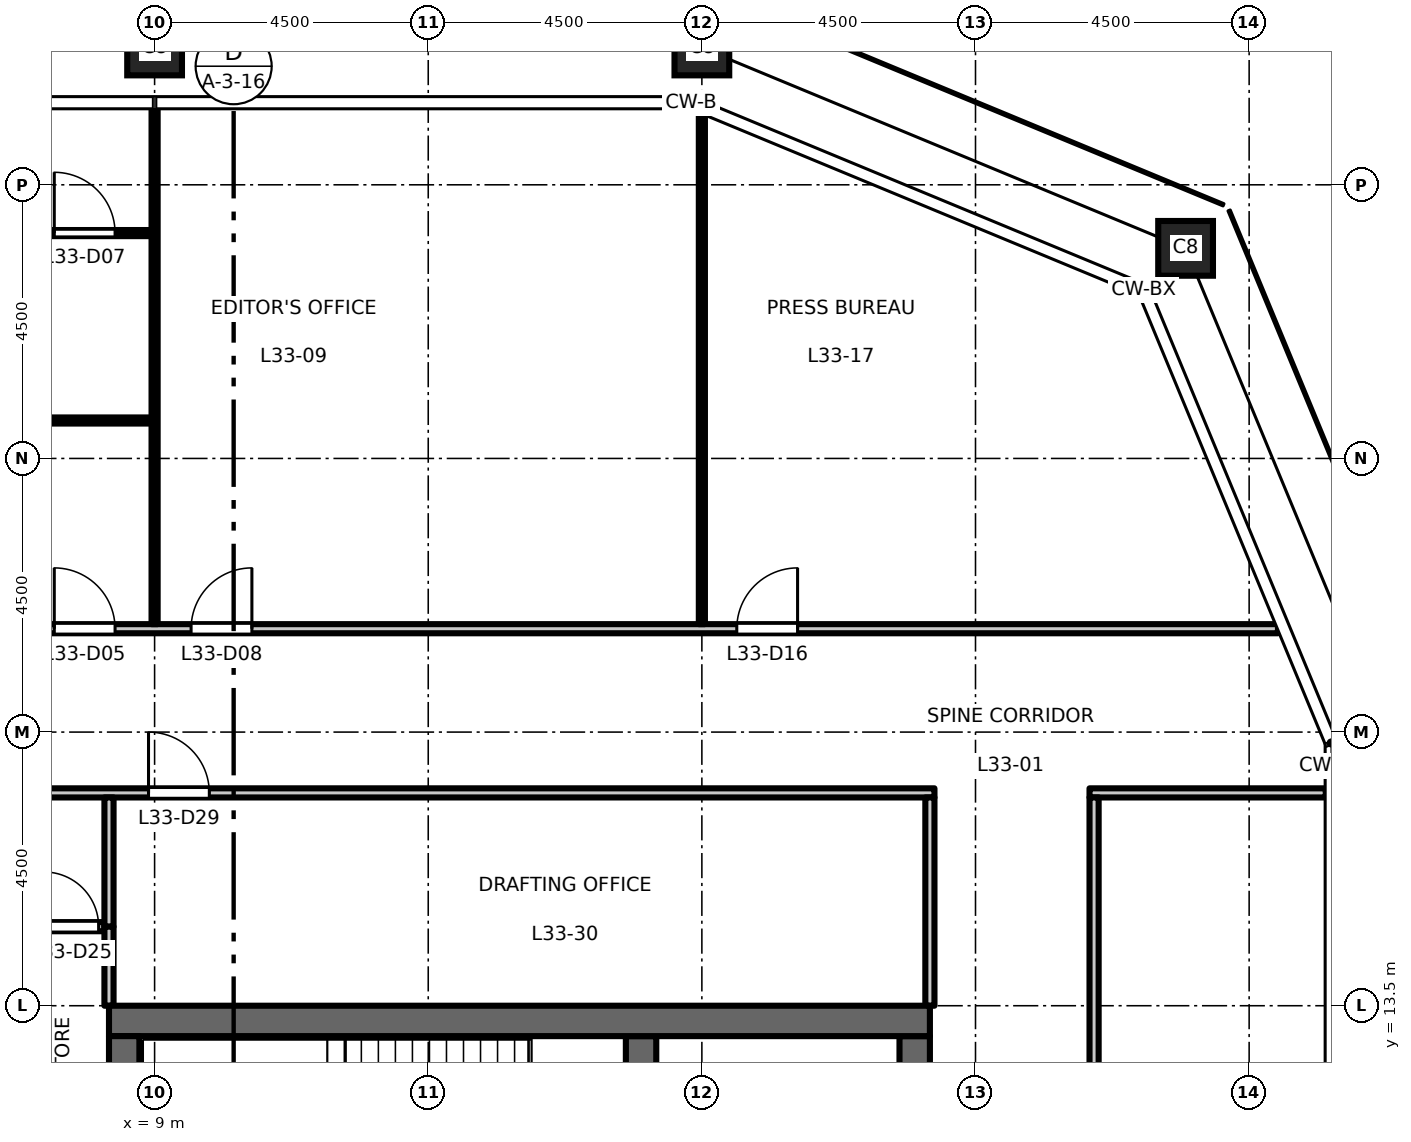
"""IFC4 building model, lengths in metres.
Left out: names, types, materials, properties, quantities, classifications, styles, units other than length and angle.
Written with IfcOpenShell. Run it as: python <this file> out.ifc"""

import sys

from ifc_helpers import new_model, si_unit, direction, frame, frame_2d, origin, origin_2d, place, context, subcontext, project, spatial, rectangle, hollow_rectangle, extrude, element, fill, save


model = new_model("IFC4")
c1 = context("Model", 3, precision=1e-05, world=origin(), true_north=direction((0.0, 1.0)))
c2 = subcontext(c1, "Body", "Model", "MODEL_VIEW")
j1 = project(units=[si_unit("LENGTHUNIT", "METRE"), si_unit("PLANEANGLEUNIT", "RADIAN")], contexts=[c1])
p1 = place(None, origin())
s1 = spatial("IfcSite", under=j1, at=p1, CompositionType="ELEMENT")
p2 = place(p1, origin())
s2 = spatial("IfcBuilding", under=s1, at=p2, CompositionType="ELEMENT")
p3 = place(p2, frame((0.0, 0.0, 154.2)))
s3 = spatial("IfcBuildingStorey", under=s2, at=p3, CompositionType="ELEMENT", Elevation=154.2)
for number, where, z_axis, x_axis in (
    (1, (25.955, 25.955, 0.0), (0.0, 0.0, 1.0), (1.0, 0.0, 0.0)),
    (2, (18.0, 29.25, 0.0), (0.0, 0.0, 1.0), (1.0, 0.0, 0.0)),
    (3, (9.0, 29.25, 0.0), (0.0, 0.0, 1.0), (1.0, 0.0, 0.0)),
):
    element("IfcColumn", number, at=place(p3, frame(where, z_axis=z_axis, x_axis=x_axis)), inside=s3, PredefinedType="COLUMN", context=c2, shape_type="SweptSolid", body=[
        extrude(hollow_rectangle(XDim=0.9, YDim=0.9, WallThickness=0.05, at=origin_2d()), origin(), (0.0, 0.0, 1.0), 4.5),
    ])
p4 = place(p3, frame((21.5, -13.0, 0.0), z_axis=(0.0, 0.0, 1.0), x_axis=(0.0, 1.0, 0.0)))
e4 = element("IfcWall", 4, at=p4, inside=s3, PredefinedType="SHEAR", context=c2, shape_type="SweptSolid", body=[
    extrude(rectangle(XDim=26.0, YDim=0.5, at=frame_2d((13.0, 0.0))), origin(), (0.0, 0.0, 1.0), 4.35),
])
p5 = place(p4, frame((16.825, 0.0, 0.0)))
e5 = element("IfcOpeningElement", 5, at=p5, cuts=e4, PredefinedType="OPENING", context=c2, shape_type="SweptSolid", body=[
    extrude(rectangle(XDim=1.8, YDim=2.1, at=frame_2d((0.9, 1.05))), frame((0.0, 0.26, 0.0), z_axis=(0.0, -1.0, 0.0), x_axis=(1.0, 0.0, 0.0)), (0.0, 0.0, 1.0), 0.52),
])
p6 = place(p4, frame((7.375, 0.0, 0.0)))
e6 = element("IfcOpeningElement", 6, at=p6, cuts=e4, PredefinedType="OPENING", context=c2, shape_type="SweptSolid", body=[
    extrude(rectangle(XDim=1.8, YDim=2.1, at=frame_2d((0.9, 1.05))), frame((0.0, 0.26, 0.0), z_axis=(0.0, -1.0, 0.0), x_axis=(1.0, 0.0, 0.0)), (0.0, 0.0, 1.0), 0.52),
])
p7 = place(p4, frame((23.8, 0.0, 0.0)))
e7 = element("IfcOpeningElement", 7, at=p7, cuts=e4, PredefinedType="OPENING", context=c2, shape_type="SweptSolid", body=[
    extrude(rectangle(XDim=0.9, YDim=2.1, at=frame_2d((0.45, 1.05))), frame((0.0, 0.26, 0.0), z_axis=(0.0, -1.0, 0.0), x_axis=(1.0, 0.0, 0.0)), (0.0, 0.0, 1.0), 0.52),
])
p8 = place(p3, frame((17.0, 6.425, 0.0), z_axis=(0.0, 0.0, 1.0), x_axis=(0.0, 1.0, 0.0)))
e8 = element("IfcWall", 8, at=p8, inside=s3, PredefinedType="SHEAR", context=c2, shape_type="SweptSolid", body=[
    extrude(rectangle(XDim=6.575, YDim=0.5, at=frame_2d((3.288, 0.0))), origin(), (0.0, 0.0, 1.0), 4.35),
])
p9 = place(p3, frame((8.25, 13.25, 0.0), z_axis=(0.0, 0.0, 1.0), x_axis=(1.0, 0.0, 0.0)))
e9 = element("IfcWall", 9, at=p9, inside=s3, PredefinedType="SHEAR", context=c2, shape_type="SweptSolid", body=[
    extrude(rectangle(XDim=13.5, YDim=0.5, at=frame_2d((6.75, 0.0))), origin(), (0.0, 0.0, 1.0), 4.35),
])
p10 = place(p3, frame((8.5, -13.0, 0.0), z_axis=(0.0, 0.0, 1.0), x_axis=(0.0, 1.0, 0.0)))
e10 = element("IfcWall", 10, at=p10, inside=s3, PredefinedType="SHEAR", context=c2, shape_type="SweptSolid", body=[
    extrude(rectangle(XDim=26.0, YDim=0.5, at=frame_2d((13.0, 0.0))), origin(), (0.0, 0.0, 1.0), 4.35),
])
p11 = place(p3, frame((6.78, 14.8, 0.0), z_axis=(0.0, 0.0, 1.0), x_axis=(1.0, 0.0, 0.0)))
e11 = element("IfcWall", 11, at=p11, inside=s3, PredefinedType="PARTITIONING", context=c2, shape_type="SweptSolid", body=[
    extrude(rectangle(XDim=1.395, YDim=0.15, at=frame_2d((0.698, 0.0))), origin(), (0.0, 0.0, 1.0), 4.35),
])
p12 = place(p11, frame((0.4, 0.0, 0.0)))
e12 = element("IfcOpeningElement", 12, at=p12, cuts=e11, PredefinedType="OPENING", context=c2, shape_type="SweptSolid", body=[
    extrude(rectangle(XDim=0.9, YDim=2.1, at=frame_2d((0.45, 1.05))), frame((0.0, 0.085, 0.0), z_axis=(0.0, -1.0, 0.0), x_axis=(1.0, 0.0, 0.0)), (0.0, 0.0, 1.0), 0.17),
])
p13 = place(p3, frame((-21.825, 17.0, 0.0), z_axis=(0.0, 0.0, 1.0), x_axis=(1.0, 0.0, 0.0)))
e13 = element("IfcWall", 13, at=p13, inside=s3, PredefinedType="PARTITIONING", context=c2, shape_type="SweptSolid", body=[
    extrude(rectangle(XDim=43.65, YDim=0.15, at=frame_2d((21.825, 0.0))), origin(), (0.0, 0.0, 1.0), 4.35),
])
p14 = place(p13, frame((14.225, 0.0, 0.0)))
e14 = element("IfcOpeningElement", 14, at=p14, cuts=e13, PredefinedType="OPENING", context=c2, shape_type="SweptSolid", body=[
    extrude(rectangle(XDim=1.0, YDim=2.1, at=frame_2d((0.5, 1.05))), frame((0.0, 0.085, 0.0), z_axis=(0.0, -1.0, 0.0), x_axis=(1.0, 0.0, 0.0)), (0.0, 0.0, 1.0), 0.17),
])
p15 = place(p13, frame((11.975, 0.0, 0.0)))
e15 = element("IfcOpeningElement", 15, at=p15, cuts=e13, PredefinedType="OPENING", context=c2, shape_type="SweptSolid", body=[
    extrude(rectangle(XDim=1.0, YDim=2.1, at=frame_2d((0.5, 1.05))), frame((0.0, 0.085, 0.0), z_axis=(0.0, -1.0, 0.0), x_axis=(1.0, 0.0, 0.0)), (0.0, 0.0, 1.0), 0.17),
])
p16 = place(p13, frame((30.725, 0.0, 0.0)))
e16 = element("IfcOpeningElement", 16, at=p16, cuts=e13, PredefinedType="OPENING", context=c2, shape_type="SweptSolid", body=[
    extrude(rectangle(XDim=1.0, YDim=2.1, at=frame_2d((0.5, 1.05))), frame((0.0, 0.085, 0.0), z_axis=(0.0, -1.0, 0.0), x_axis=(1.0, 0.0, 0.0)), (0.0, 0.0, 1.0), 0.17),
])
p17 = place(p3, frame((24.375, 17.0, 0.0), z_axis=(0.0, 0.0, 1.0), x_axis=(1.0, 0.0, 0.0)))
e17 = element("IfcWall", 17, at=p17, inside=s3, PredefinedType="PARTITIONING", context=c2, shape_type="SweptSolid", body=[
    extrude(rectangle(XDim=3.885, YDim=0.15, at=frame_2d((1.942, 0.0))), origin(), (0.0, 0.0, 1.0), 4.35),
])
p18 = place(p3, frame((-27.474, 19.7, 0.0), z_axis=(0.0, 0.0, 1.0), x_axis=(1.0, 0.0, 0.0)))
e18 = element("IfcWall", 18, at=p18, inside=s3, PredefinedType="PARTITIONING", context=c2, shape_type="SweptSolid", body=[
    extrude(rectangle(XDim=54.948, YDim=0.15, at=frame_2d((27.474, 0.0))), origin(), (0.0, 0.0, 1.0), 4.35),
])
p19 = place(p18, frame((16.824, 0.0, 0.0)))
e19 = element("IfcOpeningElement", 19, at=p19, cuts=e18, PredefinedType="OPENING", context=c2, shape_type="SweptSolid", body=[
    extrude(rectangle(XDim=1.0, YDim=2.1, at=frame_2d((0.5, 1.05))), frame((0.0, 0.085, 0.0), z_axis=(0.0, -1.0, 0.0), x_axis=(1.0, 0.0, 0.0)), (0.0, 0.0, 1.0), 0.17),
])
p20 = place(p18, frame((19.074, 0.0, 0.0)))
e20 = element("IfcOpeningElement", 20, at=p20, cuts=e18, PredefinedType="OPENING", context=c2, shape_type="SweptSolid", body=[
    extrude(rectangle(XDim=1.0, YDim=2.1, at=frame_2d((0.5, 1.05))), frame((0.0, 0.085, 0.0), z_axis=(0.0, -1.0, 0.0), x_axis=(1.0, 0.0, 0.0)), (0.0, 0.0, 1.0), 0.17),
])
p21 = place(p18, frame((34.824, 0.0, 0.0)))
e21 = element("IfcOpeningElement", 21, at=p21, cuts=e18, PredefinedType="OPENING", context=c2, shape_type="SweptSolid", body=[
    extrude(rectangle(XDim=1.0, YDim=2.1, at=frame_2d((0.5, 1.05))), frame((0.0, 0.085, 0.0), z_axis=(0.0, -1.0, 0.0), x_axis=(1.0, 0.0, 0.0)), (0.0, 0.0, 1.0), 0.17),
])
p22 = place(p18, frame((37.074, 0.0, 0.0)))
e22 = element("IfcOpeningElement", 22, at=p22, cuts=e18, PredefinedType="OPENING", context=c2, shape_type="SweptSolid", body=[
    extrude(rectangle(XDim=1.0, YDim=2.1, at=frame_2d((0.5, 1.05))), frame((0.0, 0.085, 0.0), z_axis=(0.0, -1.0, 0.0), x_axis=(1.0, 0.0, 0.0)), (0.0, 0.0, 1.0), 0.17),
])
p23 = place(p18, frame((7.824, 0.0, 0.0)))
e23 = element("IfcOpeningElement", 23, at=p23, cuts=e18, PredefinedType="OPENING", context=c2, shape_type="SweptSolid", body=[
    extrude(rectangle(XDim=1.0, YDim=2.1, at=frame_2d((0.5, 1.05))), frame((0.0, 0.085, 0.0), z_axis=(0.0, -1.0, 0.0), x_axis=(1.0, 0.0, 0.0)), (0.0, 0.0, 1.0), 0.17),
])
p24 = place(p18, frame((46.048, 0.0, 0.0)))
e24 = element("IfcOpeningElement", 24, at=p24, cuts=e18, PredefinedType="OPENING", context=c2, shape_type="SweptSolid", body=[
    extrude(rectangle(XDim=1.0, YDim=2.1, at=frame_2d((0.5, 1.05))), frame((0.0, 0.085, 0.0), z_axis=(0.0, -1.0, 0.0), x_axis=(1.0, 0.0, 0.0)), (0.0, 0.0, 1.0), 0.17),
])
p25 = place(p3, frame((0.05, 23.124, 0.0), z_axis=(0.0, 0.0, 1.0), x_axis=(1.0, 0.0, 0.0)))
e25 = element("IfcWall", 25, at=p25, inside=s3, PredefinedType="PARTITIONING", context=c2, shape_type="SweptSolid", body=[
    extrude(rectangle(XDim=8.9, YDim=0.1, at=frame_2d((4.45, 0.0))), origin(), (0.0, 0.0, 1.0), 4.35),
])
p26 = place(p25, frame((0.55, 0.0, 0.0)))
e26 = element("IfcOpeningElement", 26, at=p26, cuts=e25, PredefinedType="OPENING", context=c2, shape_type="SweptSolid", body=[
    extrude(rectangle(XDim=1.0, YDim=2.1, at=frame_2d((0.5, 1.05))), frame((0.0, 0.06, 0.0), z_axis=(0.0, -1.0, 0.0), x_axis=(1.0, 0.0, 0.0)), (0.0, 0.0, 1.0), 0.12),
])
p27 = place(p3, frame((0.05, 26.206, 0.0), z_axis=(0.0, 0.0, 1.0), x_axis=(1.0, 0.0, 0.0)))
e27 = element("IfcWall", 27, at=p27, inside=s3, PredefinedType="PARTITIONING", context=c2, shape_type="SweptSolid", body=[
    extrude(rectangle(XDim=8.9, YDim=0.1, at=frame_2d((4.45, 0.0))), origin(), (0.0, 0.0, 1.0), 4.35),
])
p28 = place(p27, frame((7.3, 0.0, 0.0)))
e28 = element("IfcOpeningElement", 28, at=p28, cuts=e27, PredefinedType="OPENING", context=c2, shape_type="SweptSolid", body=[
    extrude(rectangle(XDim=1.0, YDim=2.1, at=frame_2d((0.5, 1.05))), frame((0.0, 0.06, 0.0), z_axis=(0.0, -1.0, 0.0), x_axis=(1.0, 0.0, 0.0)), (0.0, 0.0, 1.0), 0.12),
])
p29 = place(p3, frame((8.25, 14.8, 0.0), z_axis=(0.0, 0.0, 1.0), x_axis=(0.0, 1.0, 0.0)))
e29 = element("IfcWall", 29, at=p29, inside=s3, PredefinedType="PARTITIONING", context=c2, shape_type="SweptSolid", body=[
    extrude(rectangle(XDim=2.125, YDim=0.15, at=frame_2d((1.062, 0.0))), origin(), (0.0, 0.0, 1.0), 4.35),
])
p30 = place(p3, frame((8.25, 13.5, 0.0), z_axis=(0.0, 0.0, 1.0), x_axis=(0.0, 1.0, 0.0)))
e30 = element("IfcWall", 30, at=p30, inside=s3, PredefinedType="PARTITIONING", context=c2, shape_type="SweptSolid", body=[
    extrude(rectangle(XDim=1.3, YDim=0.15, at=frame_2d((0.65, 0.0))), origin(), (0.0, 0.0, 1.0), 4.35),
])
p31 = place(p3, frame((9.0, 19.775, 0.0), z_axis=(0.0, 0.0, 1.0), x_axis=(0.0, 1.0, 0.0)))
e31 = element("IfcWall", 31, at=p31, inside=s3, PredefinedType="PARTITIONING", context=c2, shape_type="SweptSolid", body=[
    extrude(rectangle(XDim=8.485, YDim=0.1, at=frame_2d((4.243, 0.0))), origin(), (0.0, 0.0, 1.0), 3.45),
])
p32 = place(p3, frame((18.0, 19.775, 0.0), z_axis=(0.0, 0.0, 1.0), x_axis=(0.0, 1.0, 0.0)))
e32 = element("IfcWall", 32, at=p32, inside=s3, PredefinedType="PARTITIONING", context=c2, shape_type="SweptSolid", body=[
    extrude(rectangle(XDim=8.403, YDim=0.1, at=frame_2d((4.202, 0.0))), origin(), (0.0, 0.0, 1.0), 3.45),
])
p33 = place(p3, frame((21.75, 13.5, 0.0), z_axis=(0.0, 0.0, 1.0), x_axis=(0.0, 1.0, 0.0)))
e33 = element("IfcWall", 33, at=p33, inside=s3, PredefinedType="PARTITIONING", context=c2, shape_type="SweptSolid", body=[
    extrude(rectangle(XDim=3.425, YDim=0.15, at=frame_2d((1.712, 0.0))), origin(), (0.0, 0.0, 1.0), 4.35),
])
p34 = place(p3, frame((24.45, -16.925, 0.0), z_axis=(0.0, 0.0, 1.0), x_axis=(0.0, 1.0, 0.0)))
e34 = element("IfcWall", 34, at=p34, inside=s3, PredefinedType="PARTITIONING", context=c2, shape_type="SweptSolid", body=[
    extrude(rectangle(XDim=33.85, YDim=0.15, at=frame_2d((16.925, 0.0))), origin(), (0.0, 0.0, 1.0), 4.35),
])
p35 = place(p34, frame((0.575, 0.0, 0.0)))
e35 = element("IfcOpeningElement", 35, at=p35, cuts=e34, PredefinedType="OPENING", context=c2, shape_type="SweptSolid", body=[
    extrude(rectangle(XDim=1.0, YDim=2.1, at=frame_2d((0.5, 1.05))), frame((0.0, 0.085, 0.0), z_axis=(0.0, -1.0, 0.0), x_axis=(1.0, 0.0, 0.0)), (0.0, 0.0, 1.0), 0.17),
])
p36 = place(p21, origin())
e36 = element("IfcDoor", 36, at=p36, inside=s3, OperationType="SINGLE_SWING_LEFT", PredefinedType="DOOR", context=c2, shape_type="SweptSolid", body=[
    extrude(rectangle(XDim=1.0, YDim=2.1, at=frame_2d((0.5, 1.05))), frame((0.0, 0.025, 0.0), z_axis=(0.0, -1.0, 0.0), x_axis=(1.0, 0.0, 0.0)), (0.0, 0.0, 1.0), 0.05),
])
fill(e21, e36)
p37 = place(p28, origin())
e37 = element("IfcDoor", 37, at=p37, inside=s3, OperationType="SINGLE_SWING_LEFT", PredefinedType="DOOR", context=c2, shape_type="SweptSolid", body=[
    extrude(rectangle(XDim=1.0, YDim=2.1, at=frame_2d((0.5, 1.05))), frame((0.0, 0.025, 0.0), z_axis=(0.0, -1.0, 0.0), x_axis=(1.0, 0.0, 0.0)), (0.0, 0.0, 1.0), 0.05),
])
fill(e28, e37)
p38 = place(p22, origin())
e38 = element("IfcDoor", 38, at=p38, inside=s3, OperationType="SINGLE_SWING_RIGHT", PredefinedType="DOOR", context=c2, shape_type="SweptSolid", body=[
    extrude(rectangle(XDim=1.0, YDim=2.1, at=frame_2d((0.5, 1.05))), frame((0.0, 0.025, 0.0), z_axis=(0.0, -1.0, 0.0), x_axis=(1.0, 0.0, 0.0)), (0.0, 0.0, 1.0), 0.05),
])
fill(e22, e38)
p39 = place(p24, origin())
e39 = element("IfcDoor", 39, at=p39, inside=s3, OperationType="SINGLE_SWING_RIGHT", PredefinedType="DOOR", context=c2, shape_type="SweptSolid", body=[
    extrude(rectangle(XDim=1.0, YDim=2.1, at=frame_2d((0.5, 1.05))), frame((0.0, 0.025, 0.0), z_axis=(0.0, -1.0, 0.0), x_axis=(1.0, 0.0, 0.0)), (0.0, 0.0, 1.0), 0.05),
])
fill(e24, e39)
p40 = place(p12, origin())
e40 = element("IfcDoor", 40, at=p40, inside=s3, OperationType="SINGLE_SWING_LEFT", PredefinedType="DOOR", context=c2, shape_type="SweptSolid", body=[
    extrude(rectangle(XDim=0.9, YDim=2.1, at=frame_2d((0.45, 1.05))), frame((0.0, 0.025, 0.0), z_axis=(0.0, -1.0, 0.0), x_axis=(1.0, 0.0, 0.0)), (0.0, 0.0, 1.0), 0.05),
])
fill(e12, e40)
p41 = place(p16, origin())
e41 = element("IfcDoor", 41, at=p41, inside=s3, OperationType="SINGLE_SWING_LEFT", PredefinedType="DOOR", context=c2, shape_type="SweptSolid", body=[
    extrude(rectangle(XDim=1.0, YDim=2.1, at=frame_2d((0.5, 1.05))), frame((0.0, 0.025, 0.0), z_axis=(0.0, -1.0, 0.0), x_axis=(1.0, 0.0, 0.0)), (0.0, 0.0, 1.0), 0.05),
])
fill(e16, e41)
save(model, sys.argv[1])
